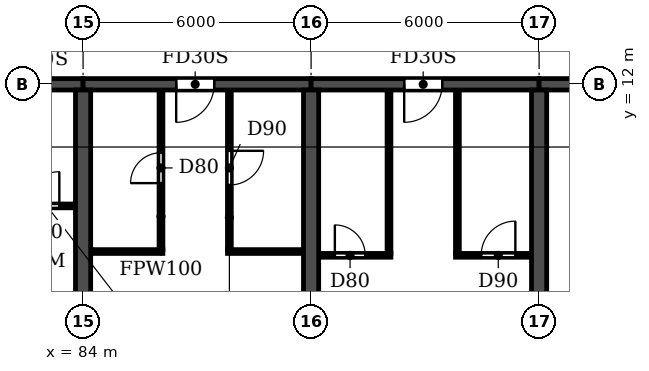
"""IFC4 building model, lengths in metres.
Left out: names, types, materials, properties, quantities, classifications, styles, units other than length and angle.
Written with IfcOpenShell. Run it as: python <this file> out.ifc"""

import sys

from ifc_helpers import new_model, si_unit, direction, frame, frame_2d, origin, place, context, subcontext, project, spatial, rectangle, extrude, element, fill, save


model = new_model("IFC4")
c1 = context("Model", 3, precision=1e-05, world=origin(), true_north=direction((0.0, 1.0)))
c2 = subcontext(c1, "Body", "Model", "MODEL_VIEW")
j1 = project(units=[si_unit("LENGTHUNIT", "METRE"), si_unit("PLANEANGLEUNIT", "RADIAN")], contexts=[c1])
p1 = place(None, origin())
s1 = spatial("IfcSite", under=j1, at=p1, CompositionType="ELEMENT")
p2 = place(p1, origin())
s2 = spatial("IfcBuilding", under=s1, at=p2, CompositionType="ELEMENT")
p3 = place(p2, frame((0.0, 0.0, 49.8)))
s3 = spatial("IfcBuildingStorey", under=s2, at=p3, CompositionType="ELEMENT", Elevation=49.8)
for number, where, z_axis, x_axis in (
    (1, (84.0, 0.2, 0.0), (0.0, 0.0, 1.0), (0.0, 1.0, 0.0)),
    (2, (90.0, 0.2, 0.0), (0.0, 0.0, 1.0), (0.0, 1.0, 0.0)),
    (3, (96.0, 0.2, 0.0), (0.0, 0.0, 1.0), (0.0, 1.0, 0.0)),
):
    element("IfcWall", number, at=place(p3, frame(where, z_axis=z_axis, x_axis=x_axis)), inside=s3, PredefinedType="SHEAR", context=c2, shape_type="SweptSolid", body=[
        extrude(rectangle(XDim=11.65, YDim=0.4, at=frame_2d((5.825, 0.0))), origin(), (0.0, 0.0, 1.0), 3.0),
    ])
p4 = place(p3, frame((78.0, 12.0, 0.0), z_axis=(0.0, 0.0, 1.0), x_axis=(1.0, 0.0, 0.0)))
e4 = element("IfcWall", 4, at=p4, inside=s3, PredefinedType="SHEAR", context=c2, shape_type="SweptSolid", body=[
    extrude(rectangle(XDim=6.0, YDim=0.3, at=frame_2d((3.0, 0.0))), origin(), (0.0, 0.0, 1.0), 2.4),
])
p5 = place(p4, frame((2.45, 0.0, 0.0)))
e5 = element("IfcOpeningElement", 5, at=p5, cuts=e4, PredefinedType="OPENING", context=c2, shape_type="SweptSolid", body=[
    extrude(rectangle(XDim=1.0, YDim=2.1, at=frame_2d((0.5, 1.05))), frame((0.0, 0.16, 0.0), z_axis=(0.0, -1.0, 0.0), x_axis=(1.0, 0.0, 0.0)), (0.0, 0.0, 1.0), 0.32),
])
p6 = place(p3, frame((84.0, 12.0, 0.0), z_axis=(0.0, 0.0, 1.0), x_axis=(1.0, 0.0, 0.0)))
e6 = element("IfcWall", 6, at=p6, inside=s3, PredefinedType="SHEAR", context=c2, shape_type="SweptSolid", body=[
    extrude(rectangle(XDim=6.0, YDim=0.3, at=frame_2d((3.0, 0.0))), origin(), (0.0, 0.0, 1.0), 2.4),
])
p7 = place(p6, frame((2.45, 0.0, 0.0)))
e7 = element("IfcOpeningElement", 7, at=p7, cuts=e6, PredefinedType="OPENING", context=c2, shape_type="SweptSolid", body=[
    extrude(rectangle(XDim=1.0, YDim=2.1, at=frame_2d((0.5, 1.05))), frame((0.0, 0.16, 0.0), z_axis=(0.0, -1.0, 0.0), x_axis=(1.0, 0.0, 0.0)), (0.0, 0.0, 1.0), 0.32),
])
p8 = place(p3, frame((90.0, 12.0, 0.0), z_axis=(0.0, 0.0, 1.0), x_axis=(1.0, 0.0, 0.0)))
e8 = element("IfcWall", 8, at=p8, inside=s3, PredefinedType="SHEAR", context=c2, shape_type="SweptSolid", body=[
    extrude(rectangle(XDim=6.0, YDim=0.3, at=frame_2d((3.0, 0.0))), origin(), (0.0, 0.0, 1.0), 2.4),
])
p9 = place(p8, frame((2.45, 0.0, 0.0)))
e9 = element("IfcOpeningElement", 9, at=p9, cuts=e8, PredefinedType="OPENING", context=c2, shape_type="SweptSolid", body=[
    extrude(rectangle(XDim=1.0, YDim=2.1, at=frame_2d((0.5, 1.05))), frame((0.0, 0.16, 0.0), z_axis=(0.0, -1.0, 0.0), x_axis=(1.0, 0.0, 0.0)), (0.0, 0.0, 1.0), 0.32),
])
p10 = place(p3, frame((96.0, 12.0, 0.0), z_axis=(0.0, 0.0, 1.0), x_axis=(1.0, 0.0, 0.0)))
e10 = element("IfcWall", 10, at=p10, inside=s3, PredefinedType="SHEAR", context=c2, shape_type="SweptSolid", body=[
    extrude(rectangle(XDim=5.8, YDim=0.3, at=frame_2d((2.9, 0.0))), origin(), (0.0, 0.0, 1.0), 2.4),
])
p11 = place(p10, frame((2.5, 0.0, 0.0)))
e11 = element("IfcOpeningElement", 11, at=p11, cuts=e10, PredefinedType="OPENING", context=c2, shape_type="SweptSolid", body=[
    extrude(rectangle(XDim=1.0, YDim=2.1, at=frame_2d((0.5, 1.05))), frame((0.0, 0.16, 0.0), z_axis=(0.0, -1.0, 0.0), x_axis=(1.0, 0.0, 0.0)), (0.0, 0.0, 1.0), 0.32),
])
p12 = place(p3, frame((90.21, 7.5, 0.0), z_axis=(0.0, 0.0, 1.0), x_axis=(1.0, 0.0, 0.0)))
e12 = element("IfcWall", 12, at=p12, inside=s3, PredefinedType="PARTITIONING", context=c2, shape_type="SweptSolid", body=[
    extrude(rectangle(XDim=1.89, YDim=0.1, at=frame_2d((0.945, 0.0))), origin(), (0.0, 0.0, 1.0), 3.0),
])
p13 = place(p12, frame((0.415, 0.0, 0.0)))
e13 = element("IfcOpeningElement", 13, at=p13, cuts=e12, PredefinedType="OPENING", context=c2, shape_type="SweptSolid", body=[
    extrude(rectangle(XDim=0.8, YDim=2.1, at=frame_2d((0.4, 1.05))), frame((0.0, 0.06, 0.0), z_axis=(0.0, -1.0, 0.0), x_axis=(1.0, 0.0, 0.0)), (0.0, 0.0, 1.0), 0.12),
])
p14 = place(p3, frame((93.8, 7.5, 0.0), z_axis=(0.0, 0.0, 1.0), x_axis=(1.0, 0.0, 0.0)))
e14 = element("IfcWall", 14, at=p14, inside=s3, PredefinedType="PARTITIONING", context=c2, shape_type="SweptSolid", body=[
    extrude(rectangle(XDim=1.99, YDim=0.1, at=frame_2d((0.995, 0.0))), origin(), (0.0, 0.0, 1.0), 3.0),
])
p15 = place(p14, frame((0.675, 0.0, 0.0)))
e15 = element("IfcOpeningElement", 15, at=p15, cuts=e14, PredefinedType="OPENING", context=c2, shape_type="SweptSolid", body=[
    extrude(rectangle(XDim=0.9, YDim=2.1, at=frame_2d((0.45, 1.05))), frame((0.0, 0.06, 0.0), z_axis=(0.0, -1.0, 0.0), x_axis=(1.0, 0.0, 0.0)), (0.0, 0.0, 1.0), 0.12),
])
p16 = place(p3, frame((84.21, 7.6, 0.0), z_axis=(0.0, 0.0, 1.0), x_axis=(1.0, 0.0, 0.0)))
e16 = element("IfcWall", 16, at=p16, inside=s3, PredefinedType="PARTITIONING", context=c2, shape_type="SweptSolid", body=[
    extrude(rectangle(XDim=1.89, YDim=0.1, at=frame_2d((0.945, 0.0))), origin(), (0.0, 0.0, 1.0), 3.0),
])
p17 = place(p3, frame((87.8, 7.6, 0.0), z_axis=(0.0, 0.0, 1.0), x_axis=(1.0, 0.0, 0.0)))
e17 = element("IfcWall", 17, at=p17, inside=s3, PredefinedType="PARTITIONING", context=c2, shape_type="SweptSolid", body=[
    extrude(rectangle(XDim=1.99, YDim=0.1, at=frame_2d((0.995, 0.0))), origin(), (0.0, 0.0, 1.0), 3.0),
])
p18 = place(p3, frame((81.8, 8.8, 0.0), z_axis=(0.0, 0.0, 1.0), x_axis=(1.0, 0.0, 0.0)))
e18 = element("IfcWall", 18, at=p18, inside=s3, PredefinedType="PARTITIONING", context=c2, shape_type="SweptSolid", body=[
    extrude(rectangle(XDim=1.99, YDim=0.1, at=frame_2d((0.995, 0.0))), origin(), (0.0, 0.0, 1.0), 3.0),
])
p19 = place(p18, frame((0.675, 0.0, 0.0)))
e19 = element("IfcOpeningElement", 19, at=p19, cuts=e18, PredefinedType="OPENING", context=c2, shape_type="SweptSolid", body=[
    extrude(rectangle(XDim=0.9, YDim=2.1, at=frame_2d((0.45, 1.05))), frame((0.0, 0.06, 0.0), z_axis=(0.0, -1.0, 0.0), x_axis=(1.0, 0.0, 0.0)), (0.0, 0.0, 1.0), 0.12),
])
p20 = place(p3, frame((86.05, 7.65, 0.0), z_axis=(0.0, 0.0, 1.0), x_axis=(0.0, 1.0, 0.0)))
e20 = element("IfcWall", 20, at=p20, inside=s3, PredefinedType="PARTITIONING", context=c2, shape_type="SweptSolid", body=[
    extrude(rectangle(XDim=4.19, YDim=0.1, at=frame_2d((2.095, 0.0))), origin(), (0.0, 0.0, 1.0), 3.0),
])
p21 = place(p20, frame((1.75, 0.0, 0.0)))
e21 = element("IfcOpeningElement", 21, at=p21, cuts=e20, PredefinedType="OPENING", context=c2, shape_type="SweptSolid", body=[
    extrude(rectangle(XDim=0.8, YDim=2.1, at=frame_2d((0.4, 1.05))), frame((0.0, 0.06, 0.0), z_axis=(0.0, -1.0, 0.0), x_axis=(1.0, 0.0, 0.0)), (0.0, 0.0, 1.0), 0.12),
])
p22 = place(p3, frame((87.85, 7.65, 0.0), z_axis=(0.0, 0.0, 1.0), x_axis=(0.0, 1.0, 0.0)))
e22 = element("IfcWall", 22, at=p22, inside=s3, PredefinedType="PARTITIONING", context=c2, shape_type="SweptSolid", body=[
    extrude(rectangle(XDim=4.19, YDim=0.1, at=frame_2d((2.095, 0.0))), origin(), (0.0, 0.0, 1.0), 3.0),
])
p23 = place(p22, frame((1.7, 0.0, 0.0)))
e23 = element("IfcOpeningElement", 23, at=p23, cuts=e22, PredefinedType="OPENING", context=c2, shape_type="SweptSolid", body=[
    extrude(rectangle(XDim=0.9, YDim=2.1, at=frame_2d((0.45, 1.05))), frame((0.0, 0.06, 0.0), z_axis=(0.0, -1.0, 0.0), x_axis=(1.0, 0.0, 0.0)), (0.0, 0.0, 1.0), 0.12),
])
for number, where, z_axis, x_axis in (
    (24, (92.05, 7.55, 0.0), (0.0, 0.0, 1.0), (0.0, 1.0, 0.0)),
    (25, (93.85, 7.55, 0.0), (0.0, 0.0, 1.0), (0.0, 1.0, 0.0)),
):
    element("IfcWall", number, at=place(p3, frame(where, z_axis=z_axis, x_axis=x_axis)), inside=s3, PredefinedType="PARTITIONING", context=c2, shape_type="SweptSolid", body=[
        extrude(rectangle(XDim=4.29, YDim=0.1, at=frame_2d((2.145, 0.0))), origin(), (0.0, 0.0, 1.0), 3.0),
    ])
p24 = place(p19, origin())
e26 = element("IfcDoor", 26, at=p24, inside=s3, OperationType="SINGLE_SWING_RIGHT", PredefinedType="DOOR", context=c2, shape_type="SweptSolid", body=[
    extrude(rectangle(XDim=0.9, YDim=2.1, at=frame_2d((0.45, 1.05))), frame((0.0, 0.025, 0.0), z_axis=(0.0, -1.0, 0.0), x_axis=(1.0, 0.0, 0.0)), (0.0, 0.0, 1.0), 0.05),
])
fill(e19, e26)
p25 = place(p21, origin())
e27 = element("IfcDoor", 27, at=p25, inside=s3, OperationType="SINGLE_SWING_LEFT", PredefinedType="DOOR", context=c2, shape_type="SweptSolid", body=[
    extrude(rectangle(XDim=0.8, YDim=2.1, at=frame_2d((0.4, 1.05))), frame((0.0, 0.025, 0.0), z_axis=(0.0, -1.0, 0.0), x_axis=(1.0, 0.0, 0.0)), (0.0, 0.0, 1.0), 0.05),
])
fill(e21, e27)
p26 = place(p7, frame((1.0, 0.0, 0.0), z_axis=(0.0, 0.0, 1.0), x_axis=(-1.0, 0.0, 0.0)))
e28 = element("IfcDoor", 28, at=p26, inside=s3, OperationType="SINGLE_SWING_RIGHT", PredefinedType="DOOR", context=c2, shape_type="SweptSolid", body=[
    extrude(rectangle(XDim=1.0, YDim=2.1, at=frame_2d((0.5, 1.05))), frame((0.0, 0.025, 0.0), z_axis=(0.0, -1.0, 0.0), x_axis=(1.0, 0.0, 0.0)), (0.0, 0.0, 1.0), 0.05),
])
fill(e7, e28)
p27 = place(p23, frame((0.9, 0.0, 0.0), z_axis=(0.0, 0.0, 1.0), x_axis=(-1.0, 0.0, 0.0)))
e29 = element("IfcDoor", 29, at=p27, inside=s3, OperationType="SINGLE_SWING_LEFT", PredefinedType="DOOR", context=c2, shape_type="SweptSolid", body=[
    extrude(rectangle(XDim=0.9, YDim=2.1, at=frame_2d((0.45, 1.05))), frame((0.0, 0.025, 0.0), z_axis=(0.0, -1.0, 0.0), x_axis=(1.0, 0.0, 0.0)), (0.0, 0.0, 1.0), 0.05),
])
fill(e23, e29)
p28 = place(p13, origin())
e30 = element("IfcDoor", 30, at=p28, inside=s3, OperationType="SINGLE_SWING_LEFT", PredefinedType="DOOR", context=c2, shape_type="SweptSolid", body=[
    extrude(rectangle(XDim=0.8, YDim=2.1, at=frame_2d((0.4, 1.05))), frame((0.0, 0.025, 0.0), z_axis=(0.0, -1.0, 0.0), x_axis=(1.0, 0.0, 0.0)), (0.0, 0.0, 1.0), 0.05),
])
fill(e13, e30)
p29 = place(p9, frame((1.0, 0.0, 0.0), z_axis=(0.0, 0.0, 1.0), x_axis=(-1.0, 0.0, 0.0)))
e31 = element("IfcDoor", 31, at=p29, inside=s3, OperationType="SINGLE_SWING_RIGHT", PredefinedType="DOOR", context=c2, shape_type="SweptSolid", body=[
    extrude(rectangle(XDim=1.0, YDim=2.1, at=frame_2d((0.5, 1.05))), frame((0.0, 0.025, 0.0), z_axis=(0.0, -1.0, 0.0), x_axis=(1.0, 0.0, 0.0)), (0.0, 0.0, 1.0), 0.05),
])
fill(e9, e31)
p30 = place(p15, origin())
e32 = element("IfcDoor", 32, at=p30, inside=s3, OperationType="SINGLE_SWING_RIGHT", PredefinedType="DOOR", context=c2, shape_type="SweptSolid", body=[
    extrude(rectangle(XDim=0.9, YDim=2.1, at=frame_2d((0.45, 1.05))), frame((0.0, 0.025, 0.0), z_axis=(0.0, -1.0, 0.0), x_axis=(1.0, 0.0, 0.0)), (0.0, 0.0, 1.0), 0.05),
])
fill(e15, e32)
save(model, sys.argv[1])
